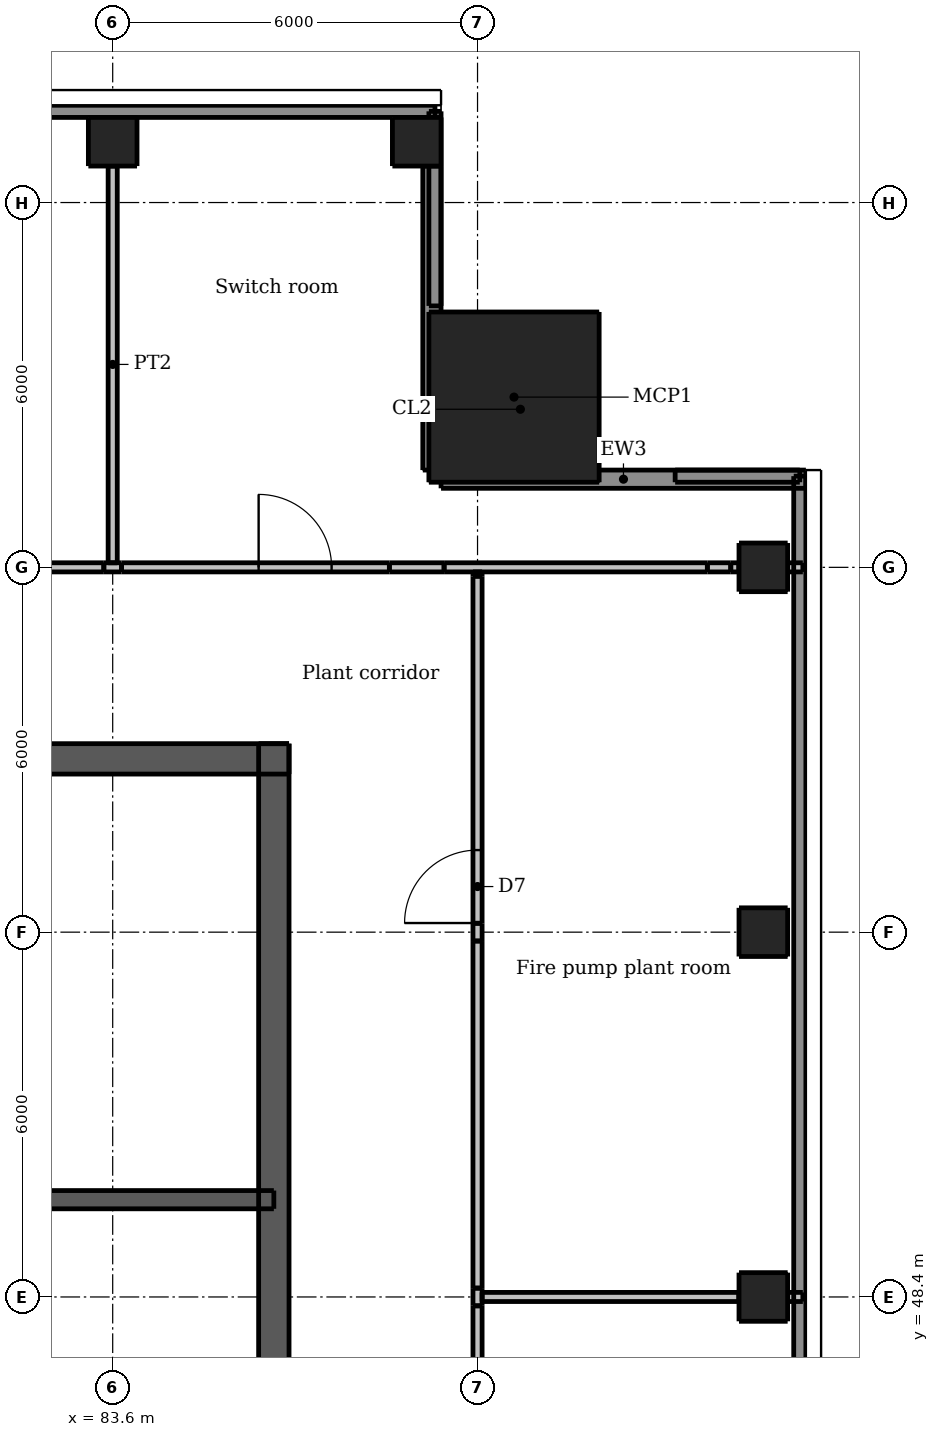
"""IFC4 building model, lengths in metres.
Left out: names, types, materials, properties, quantities, classifications, styles, units other than length and angle.
Written with IfcOpenShell. Run it as: python <this file> out.ifc"""

import sys

from ifc_helpers import new_model, si_unit, direction, frame, frame_2d, origin, origin_2d, place, context, subcontext, project, spatial, rectangle, extrude, element, fill, save


model = new_model("IFC4")
c1 = context("Model", 3, precision=1e-05, world=origin(), true_north=direction((0.0, 1.0)))
c2 = subcontext(c1, "Body", "Model", "MODEL_VIEW")
j1 = project(units=[si_unit("LENGTHUNIT", "METRE"), si_unit("PLANEANGLEUNIT", "RADIAN")], contexts=[c1])
p1 = place(None, origin())
s1 = spatial("IfcSite", under=j1, at=p1, CompositionType="ELEMENT")
p2 = place(p1, origin())
s2 = spatial("IfcBuilding", under=s1, at=p2, CompositionType="ELEMENT")
p3 = place(p2, frame((0.0, 0.0, 286.3)))
s3 = spatial("IfcBuildingStorey", under=s2, at=p3, CompositionType="ELEMENT", Elevation=286.3)
p4 = place(p3, frame((62.5, 57.25, 0.0), z_axis=(0.0, 0.0, 1.0), x_axis=(1.0, 0.0, 0.0)))
e1 = element("IfcWall", 1, at=p4, inside=s3, PredefinedType="SHEAR", context=c2, shape_type="SweptSolid", body=[
    extrude(rectangle(XDim=24.0, YDim=0.5, at=frame_2d((12.0, 0.0))), origin(), (0.0, 0.0, 1.0), 4.2),
])
p5 = place(p4, frame((21.025, 0.0, 0.0)))
e2 = element("IfcOpeningElement", 2, at=p5, cuts=e1, PredefinedType="OPENING", context=c2, shape_type="SweptSolid", body=[
    extrude(rectangle(XDim=1.1, YDim=2.1, at=frame_2d((0.55, 1.05))), frame((0.0, 0.26, 0.0), z_axis=(0.0, -1.0, 0.0), x_axis=(1.0, 0.0, 0.0)), (0.0, 0.0, 1.0), 0.52),
])
p6 = place(p4, frame((1.875, 0.0, 0.0)))
e3 = element("IfcOpeningElement", 3, at=p6, cuts=e1, PredefinedType="OPENING", context=c2, shape_type="SweptSolid", body=[
    extrude(rectangle(XDim=1.1, YDim=2.1, at=frame_2d((0.55, 1.05))), frame((0.0, 0.26, 0.0), z_axis=(0.0, -1.0, 0.0), x_axis=(1.0, 0.0, 0.0)), (0.0, 0.0, 1.0), 0.52),
])
p7 = place(p4, frame((6.405, 0.0, 0.0)))
e4 = element("IfcOpeningElement", 4, at=p7, cuts=e1, PredefinedType="OPENING", context=c2, shape_type="SweptSolid", body=[
    extrude(rectangle(XDim=0.9, YDim=2.1, at=frame_2d((0.45, 1.05))), frame((0.0, 0.26, 0.0), z_axis=(0.0, -1.0, 0.0), x_axis=(1.0, 0.0, 0.0)), (0.0, 0.0, 1.0), 0.52),
])
p8 = place(p4, frame((13.755, 0.0, 0.0)))
e5 = element("IfcOpeningElement", 5, at=p8, cuts=e1, PredefinedType="OPENING", context=c2, shape_type="SweptSolid", body=[
    extrude(rectangle(XDim=0.9, YDim=2.1, at=frame_2d((0.45, 1.05))), frame((0.0, 0.26, 0.0), z_axis=(0.0, -1.0, 0.0), x_axis=(1.0, 0.0, 0.0)), (0.0, 0.0, 1.0), 0.52),
])
p9 = place(p3, frame((86.25, 33.5, 0.0), z_axis=(0.0, 0.0, 1.0), x_axis=(0.0, 1.0, 0.0)))
e6 = element("IfcWall", 6, at=p9, inside=s3, PredefinedType="SHEAR", context=c2, shape_type="SweptSolid", body=[
    extrude(rectangle(XDim=24.0, YDim=0.5, at=frame_2d((12.0, 0.0))), origin(), (0.0, 0.0, 1.0), 4.2),
])
p10 = place(p9, frame((11.2, 0.0, 0.0)))
e7 = element("IfcOpeningElement", 7, at=p10, cuts=e6, PredefinedType="OPENING", context=c2, shape_type="SweptSolid", body=[
    extrude(rectangle(XDim=1.6, YDim=2.1, at=frame_2d((0.8, 1.05))), frame((0.0, 0.26, 0.0), z_axis=(0.0, -1.0, 0.0), x_axis=(1.0, 0.0, 0.0)), (0.0, 0.0, 1.0), 0.52),
])
p11 = place(p3, frame((62.75, 50.0, 0.0), z_axis=(0.0, 0.0, 1.0), x_axis=(1.0, 0.0, 0.0)))
e8 = element("IfcWall", 8, at=p11, inside=s3, PredefinedType="SHEAR", context=c2, shape_type="SweptSolid", body=[
    extrude(rectangle(XDim=23.5, YDim=0.3, at=frame_2d((11.75, 0.0))), origin(), (0.0, 0.0, 1.0), 4.2),
])
for number, where, z_axis, x_axis in (
    (9, (94.3, 48.4, 0.0), (0.0, 0.0, 1.0), (1.0, 0.0, 0.0)),
    (10, (94.3, 54.4, 0.0), (0.0, 0.0, 1.0), (1.0, 0.0, 0.0)),
    (11, (94.3, 60.4, 0.0), (0.0, 0.0, 1.0), (1.0, 0.0, 0.0)),
    (12, (83.6, 67.4, 0.0), (0.0, 0.0, 1.0), (1.0, 0.0, 0.0)),
    (13, (88.6, 67.4, 0.0), (0.0, 0.0, 1.0), (1.0, 0.0, 0.0)),
):
    element("IfcColumn", number, at=place(p3, frame(where, z_axis=z_axis, x_axis=x_axis)), inside=s3, PredefinedType="COLUMN", context=c2, shape_type="SweptSolid", body=[
        extrude(rectangle(XDim=0.8, YDim=0.8, at=origin_2d()), origin(), (0.0, 0.0, 1.0), 4.2),
    ])
p12 = place(p3, frame((90.2, 63.2, 0.0), z_axis=(0.0, 0.0, 1.0), x_axis=(1.0, 0.0, 0.0)))
e14 = element("IfcColumn", 14, at=p12, inside=s3, PredefinedType="COLUMN", context=c2, shape_type="SweptSolid", body=[
    extrude(rectangle(XDim=2.8, YDim=2.8, at=origin_2d()), origin(), (0.0, 0.0, 1.0), 4.5),
])
p13 = place(p3, frame((95.0, 61.85, 0.0), z_axis=(0.0, 0.0, 1.0), x_axis=(-1.0, 0.0, 0.0)))
e15 = element("IfcWall", 15, at=p13, inside=s3, PredefinedType="SOLIDWALL", context=c2, shape_type="SweptSolid", body=[
    extrude(rectangle(XDim=6.0, YDim=0.3, at=frame_2d((3.0, 0.0))), origin(), (0.0, 0.0, 1.0), 4.2),
])
p14 = place(p3, frame((88.85, 62.0, 0.0), z_axis=(0.0, 0.0, 1.0), x_axis=(0.0, 1.0, 0.0)))
e16 = element("IfcWall", 16, at=p14, inside=s3, PredefinedType="SOLIDWALL", context=c2, shape_type="SweptSolid", body=[
    extrude(rectangle(XDim=5.0, YDim=0.3, at=frame_2d((2.5, 0.0))), origin(), (0.0, 0.0, 1.0), 2.897),
])
p15 = place(p3, frame((58.1, 67.9, 4.5), z_axis=(0.0, 0.0, 1.0), x_axis=(1.0, 0.0, 0.0)))
e17 = element("IfcWall", 17, at=p15, inside=s3, PredefinedType="PARAPET", context=c2, shape_type="SweptSolid", body=[
    extrude(rectangle(XDim=30.8, YDim=0.2, at=frame_2d((15.4, 0.0))), origin(), (0.0, 0.0, 1.0), 1.1),
])
p16 = place(p3, frame((88.9, 67.9, 4.5), z_axis=(0.0, 0.0, 1.0), x_axis=(0.0, -1.0, 0.0)))
e18 = element("IfcWall", 18, at=p16, inside=s3, PredefinedType="PARAPET", context=c2, shape_type="SweptSolid", body=[
    extrude(rectangle(XDim=3.2, YDim=0.2, at=frame_2d((1.6, 0.0))), origin(), (0.0, 0.0, 1.0), 1.1),
])
p17 = place(p3, frame((92.85, 61.9, 4.5), z_axis=(0.0, 0.0, 1.0), x_axis=(1.0, 0.0, 0.0)))
e19 = element("IfcWall", 19, at=p17, inside=s3, PredefinedType="PARAPET", context=c2, shape_type="SweptSolid", body=[
    extrude(rectangle(XDim=2.05, YDim=0.2, at=frame_2d((1.025, 0.0))), origin(), (0.0, 0.0, 1.0), 1.1),
])
p18 = place(p3, frame((94.9, 61.9, 4.5), z_axis=(0.0, 0.0, 1.0), x_axis=(0.0, -1.0, 0.0)))
e20 = element("IfcWall", 20, at=p18, inside=s3, PredefinedType="PARAPET", context=c2, shape_type="SweptSolid", body=[
    extrude(rectangle(XDim=30.8, YDim=0.2, at=frame_2d((15.4, 0.0))), origin(), (0.0, 0.0, 1.0), 1.1),
])
p19 = place(p3, frame((89.675, 48.4, 0.0), z_axis=(0.0, 0.0, 1.0), x_axis=(1.0, 0.0, 0.0)))
e21 = element("IfcWall", 21, at=p19, inside=s3, PredefinedType="PARTITIONING", context=c2, shape_type="SweptSolid", body=[
    extrude(rectangle(XDim=4.225, YDim=0.15, at=frame_2d((2.112, 0.0))), origin(), (0.0, 0.0, 1.0), 3.365),
])
p20 = place(p3, frame((93.9, 48.4, 0.0), z_axis=(0.0, 0.0, 1.0), x_axis=(1.0, 0.0, 0.0)))
e22 = element("IfcWall", 22, at=p20, inside=s3, PredefinedType="PARTITIONING", context=c2, shape_type="SweptSolid", body=[
    extrude(rectangle(XDim=1.05, YDim=0.15, at=frame_2d((0.525, 0.0))), origin(), (0.0, 0.0, 1.0), 4.2),
])
p21 = place(p3, frame((77.746, 60.4, 0.0), z_axis=(0.0, 0.0, 1.0), x_axis=(1.0, 0.0, 0.0)))
e23 = element("IfcWall", 23, at=p21, inside=s3, PredefinedType="PARTITIONING", context=c2, shape_type="SweptSolid", body=[
    extrude(rectangle(XDim=5.708, YDim=0.15, at=frame_2d((2.854, 0.0))), origin(), (0.0, 0.0, 1.0), 4.2),
])
p22 = place(p3, frame((83.454, 60.4, 0.0), z_axis=(0.0, 0.0, 1.0), x_axis=(1.0, 0.0, 0.0)))
e24 = element("IfcWall", 24, at=p22, inside=s3, PredefinedType="PARTITIONING", context=c2, shape_type="SweptSolid", body=[
    extrude(rectangle(XDim=0.292, YDim=0.15, at=frame_2d((0.146, 0.0))), origin(), (0.0, 0.0, 1.0), 3.365),
])
p23 = place(p3, frame((83.746, 60.4, 0.0), z_axis=(0.0, 0.0, 1.0), x_axis=(1.0, 0.0, 0.0)))
e25 = element("IfcWall", 25, at=p23, inside=s3, PredefinedType="PARTITIONING", context=c2, shape_type="SweptSolid", body=[
    extrude(rectangle(XDim=4.404, YDim=0.15, at=frame_2d((2.202, 0.0))), origin(), (0.0, 0.0, 1.0), 4.2),
])
p24 = place(p23, frame((2.254, 0.0, 0.0)))
e26 = element("IfcOpeningElement", 26, at=p24, cuts=e25, PredefinedType="OPENING", context=c2, shape_type="SweptSolid", body=[
    extrude(rectangle(XDim=1.2, YDim=2.1, at=frame_2d((0.6, 1.05))), frame((0.0, 0.085, 0.0), z_axis=(0.0, -1.0, 0.0), x_axis=(1.0, 0.0, 0.0)), (0.0, 0.0, 1.0), 0.17),
])
p25 = place(p3, frame((88.15, 60.4, 0.0), z_axis=(0.0, 0.0, 1.0), x_axis=(1.0, 0.0, 0.0)))
e27 = element("IfcWall", 27, at=p25, inside=s3, PredefinedType="PARTITIONING", context=c2, shape_type="SweptSolid", body=[
    extrude(rectangle(XDim=0.9, YDim=0.15, at=frame_2d((0.45, 0.0))), origin(), (0.0, 0.0, 1.0), 2.897),
])
p26 = place(p3, frame((89.05, 60.4, 0.0), z_axis=(0.0, 0.0, 1.0), x_axis=(1.0, 0.0, 0.0)))
e28 = element("IfcWall", 28, at=p26, inside=s3, PredefinedType="PARTITIONING", context=c2, shape_type="SweptSolid", body=[
    extrude(rectangle(XDim=4.329, YDim=0.15, at=frame_2d((2.165, 0.0))), origin(), (0.0, 0.0, 1.0), 3.365),
])
p27 = place(p3, frame((93.379, 60.4, 0.0), z_axis=(0.0, 0.0, 1.0), x_axis=(1.0, 0.0, 0.0)))
e29 = element("IfcWall", 29, at=p27, inside=s3, PredefinedType="PARTITIONING", context=c2, shape_type="SweptSolid", body=[
    extrude(rectangle(XDim=0.385, YDim=0.15, at=frame_2d((0.193, 0.0))), origin(), (0.0, 0.0, 1.0), 3.286),
])
p28 = place(p3, frame((93.765, 60.4, 0.0), z_axis=(0.0, 0.0, 1.0), x_axis=(1.0, 0.0, 0.0)))
e30 = element("IfcWall", 30, at=p28, inside=s3, PredefinedType="PARTITIONING", context=c2, shape_type="SweptSolid", body=[
    extrude(rectangle(XDim=0.135, YDim=0.15, at=frame_2d((0.068, 0.0))), origin(), (0.0, 0.0, 1.0), 3.365),
])
p29 = place(p3, frame((93.9, 60.4, 0.0), z_axis=(0.0, 0.0, 1.0), x_axis=(1.0, 0.0, 0.0)))
e31 = element("IfcWall", 31, at=p29, inside=s3, PredefinedType="PARTITIONING", context=c2, shape_type="SweptSolid", body=[
    extrude(rectangle(XDim=1.05, YDim=0.15, at=frame_2d((0.525, 0.0))), origin(), (0.0, 0.0, 1.0), 4.2),
])
p30 = place(p3, frame((83.6, 60.475, 0.0), z_axis=(0.0, 0.0, 1.0), x_axis=(0.0, 1.0, 0.0)))
e32 = element("IfcWall", 32, at=p30, inside=s3, PredefinedType="PARTITIONING", context=c2, shape_type="SweptSolid", body=[
    extrude(rectangle(XDim=6.525, YDim=0.15, at=frame_2d((3.262, 0.0))), origin(), (0.0, 0.0, 1.0), 3.365),
])
p31 = place(p3, frame((89.6, 42.546, 0.0), z_axis=(0.0, 0.0, 1.0), x_axis=(0.0, 1.0, 0.0)))
e33 = element("IfcWall", 33, at=p31, inside=s3, PredefinedType="PARTITIONING", context=c2, shape_type="SweptSolid", body=[
    extrude(rectangle(XDim=5.708, YDim=0.15, at=frame_2d((2.854, 0.0))), origin(), (0.0, 0.0, 1.0), 4.2),
])
p32 = place(p3, frame((89.6, 48.254, 0.0), z_axis=(0.0, 0.0, 1.0), x_axis=(0.0, 1.0, 0.0)))
e34 = element("IfcWall", 34, at=p32, inside=s3, PredefinedType="PARTITIONING", context=c2, shape_type="SweptSolid", body=[
    extrude(rectangle(XDim=0.292, YDim=0.15, at=frame_2d((0.146, 0.0))), origin(), (0.0, 0.0, 1.0), 3.365),
])
p33 = place(p3, frame((89.6, 48.546, 0.0), z_axis=(0.0, 0.0, 1.0), x_axis=(0.0, 1.0, 0.0)))
e35 = element("IfcWall", 35, at=p33, inside=s3, PredefinedType="PARTITIONING", context=c2, shape_type="SweptSolid", body=[
    extrude(rectangle(XDim=5.708, YDim=0.15, at=frame_2d((2.854, 0.0))), origin(), (0.0, 0.0, 1.0), 4.2),
])
p34 = place(p3, frame((89.6, 54.254, 0.0), z_axis=(0.0, 0.0, 1.0), x_axis=(0.0, 1.0, 0.0)))
e36 = element("IfcWall", 36, at=p34, inside=s3, PredefinedType="PARTITIONING", context=c2, shape_type="SweptSolid", body=[
    extrude(rectangle(XDim=0.292, YDim=0.15, at=frame_2d((0.146, 0.0))), origin(), (0.0, 0.0, 1.0), 3.359),
])
p35 = place(p3, frame((89.6, 54.546, 0.0), z_axis=(0.0, 0.0, 1.0), x_axis=(0.0, 1.0, 0.0)))
e37 = element("IfcWall", 37, at=p35, inside=s3, PredefinedType="PARTITIONING", context=c2, shape_type="SweptSolid", body=[
    extrude(rectangle(XDim=5.708, YDim=0.15, at=frame_2d((2.854, 0.0))), origin(), (0.0, 0.0, 1.0), 4.2),
])
p36 = place(p35, frame((0.004, 0.0, 0.0)))
e38 = element("IfcOpeningElement", 38, at=p36, cuts=e37, PredefinedType="OPENING", context=c2, shape_type="SweptSolid", body=[
    extrude(rectangle(XDim=1.2, YDim=2.1, at=frame_2d((0.6, 1.05))), frame((0.0, 0.085, 0.0), z_axis=(0.0, -1.0, 0.0), x_axis=(1.0, 0.0, 0.0)), (0.0, 0.0, 1.0), 0.17),
])
p37 = place(p3, frame((89.6, 60.254, 0.0), z_axis=(0.0, 0.0, 1.0), x_axis=(0.0, 1.0, 0.0)))
e39 = element("IfcWall", 39, at=p37, inside=s3, PredefinedType="PARTITIONING", context=c2, shape_type="SweptSolid", body=[
    extrude(rectangle(XDim=0.071, YDim=0.15, at=frame_2d((0.035, 0.0))), origin(), (0.0, 0.0, 1.0), 3.365),
])
p38 = place(p5, origin())
e40 = element("IfcDoor", 40, at=p38, inside=s3, OperationType="SINGLE_SWING_RIGHT", PredefinedType="DOOR", context=c2, shape_type="SweptSolid", body=[
    extrude(rectangle(XDim=1.1, YDim=2.1, at=frame_2d((0.55, 1.05))), frame((0.0, -0.188, 0.0), z_axis=(0.0, -1.0, 0.0), x_axis=(1.0, 0.0, 0.0)), (0.0, 0.0, 1.0), 0.05),
])
fill(e2, e40)
p39 = place(p36, origin())
e41 = element("IfcDoor", 41, at=p39, inside=s3, OperationType="SINGLE_SWING_LEFT", PredefinedType="DOOR", context=c2, shape_type="SweptSolid", body=[
    extrude(rectangle(XDim=1.2, YDim=2.1, at=frame_2d((0.6, 1.05))), frame((0.0, 0.025, 0.0), z_axis=(0.0, -1.0, 0.0), x_axis=(1.0, 0.0, 0.0)), (0.0, 0.0, 1.0), 0.05),
])
fill(e38, e41)
p40 = place(p24, origin())
e42 = element("IfcDoor", 42, at=p40, inside=s3, OperationType="SINGLE_SWING_LEFT", PredefinedType="DOOR", context=c2, shape_type="SweptSolid", body=[
    extrude(rectangle(XDim=1.2, YDim=2.1, at=frame_2d((0.6, 1.05))), frame((0.0, 0.025, 0.0), z_axis=(0.0, -1.0, 0.0), x_axis=(1.0, 0.0, 0.0)), (0.0, 0.0, 1.0), 0.05),
])
fill(e26, e42)
save(model, sys.argv[1])
